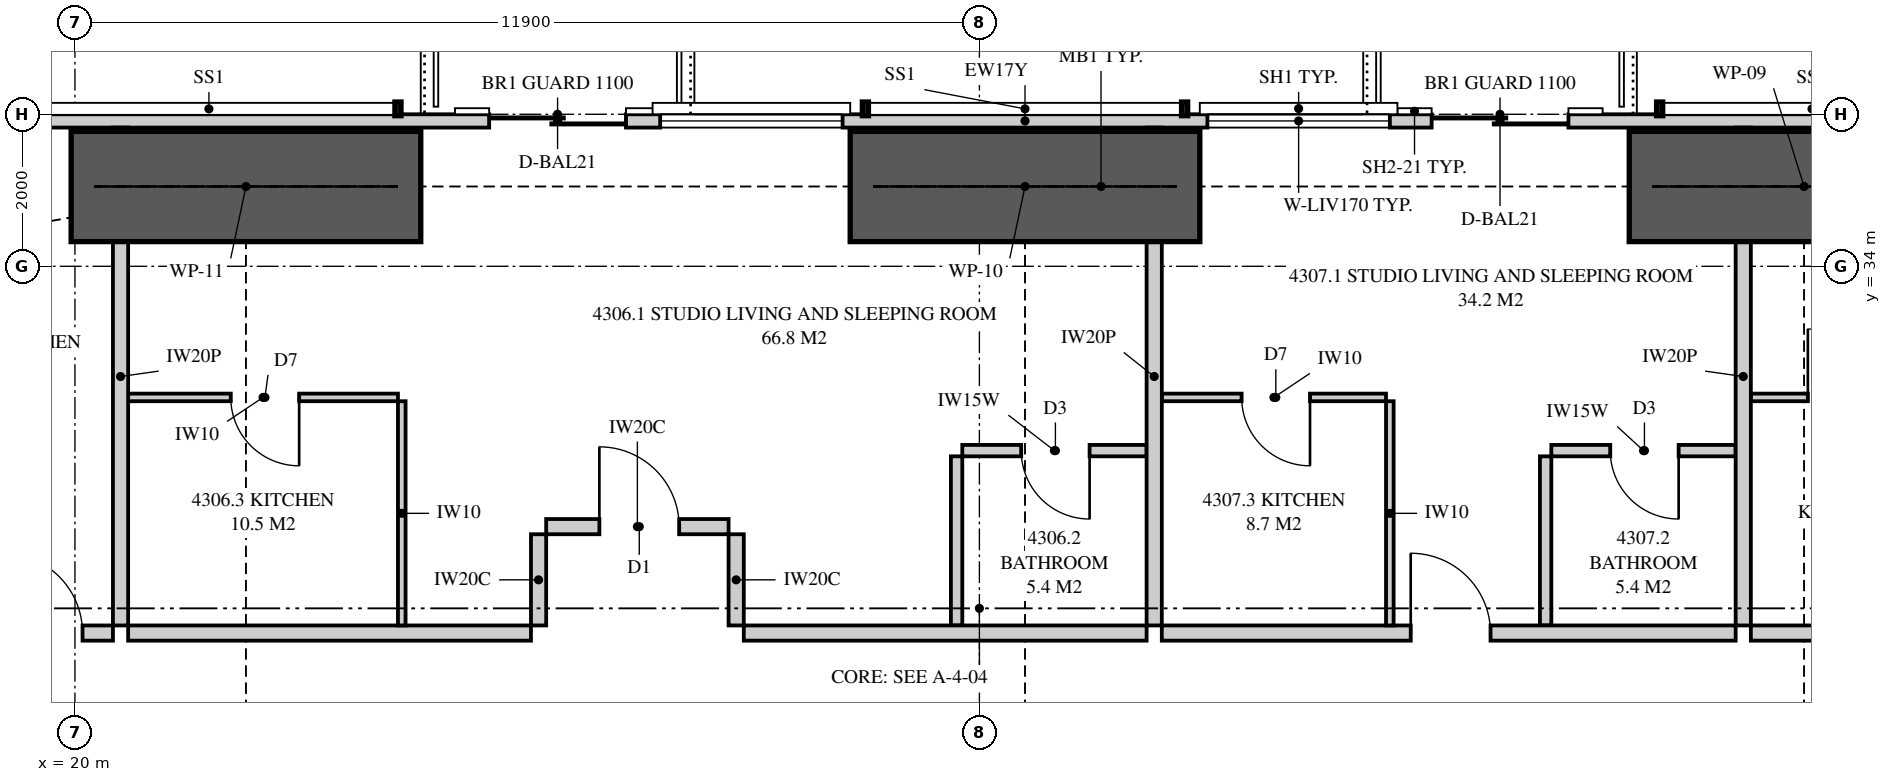
"""IFC4 building model, lengths in metres.
Left out: names, types, materials, properties, quantities, classifications, styles, units other than length and angle.
Written with IfcOpenShell. Run it as: python <this file> out.ifc"""

import sys

from ifc_helpers import new_model, si_unit, direction, frame, frame_2d, origin, place, context, subcontext, project, spatial, polyline, rectangle, outline, extrude, element, fill, save


model = new_model("IFC4")
c1 = context("Model", 3, precision=1e-05, world=origin(), true_north=direction((0.0, 1.0)))
c2 = subcontext(c1, "Body", "Model", "MODEL_VIEW")
j1 = project(units=[si_unit("LENGTHUNIT", "METRE"), si_unit("PLANEANGLEUNIT", "RADIAN")], contexts=[c1])
p1 = place(None, origin())
s1 = spatial("IfcSite", under=j1, at=p1, CompositionType="ELEMENT")
p2 = place(p1, origin())
s2 = spatial("IfcBuilding", under=s1, at=p2, CompositionType="ELEMENT")
p3 = place(p2, frame((0.0, 0.0, 161.05)))
s3 = spatial("IfcBuildingStorey", under=s2, at=p3, CompositionType="ELEMENT", Elevation=161.05)
p4 = place(p3, frame((49.949, 35.913, 0.0), z_axis=(0.0, 0.0, 1.0), x_axis=(-1.0, 0.0, 0.0)))
e1 = element("IfcWall", 1, at=p4, inside=s3, PredefinedType="SOLIDWALL", context=c2, shape_type="SweptSolid", body=[
    extrude(outline(polyline([(0.0, 0.0), (34.897, 0.0), (34.897, 3.11), (27.91, 3.11), (27.91, 2.15), (27.836, 2.15), (27.836, 3.11), (27.699, 3.11), (27.699, 2.15), (7.199, 2.15), (7.199, 3.11), (7.062, 3.11), (7.062, 2.15), (6.987, 2.15), (6.987, 3.11), (0.0, 3.11), (0.0, 0.0)])), frame((0.0, 0.087, 0.0), z_axis=(0.0, -1.0, 0.0), x_axis=(1.0, 0.0, 0.0)), (0.0, 0.0, 1.0), 0.175),
])
p5 = place(p4, frame((2.389, 0.0, 0.4)))
e2 = element("IfcOpeningElement", 2, at=p5, cuts=e1, PredefinedType="OPENING", context=c2, shape_type="SweptSolid", body=[
    extrude(rectangle(XDim=2.4, YDim=1.7, at=frame_2d((1.2, 0.85))), frame((0.0, 0.097, 0.0), z_axis=(0.0, -1.0, 0.0), x_axis=(1.0, 0.0, 0.0)), (0.0, 0.0, 1.0), 0.195),
])
p6 = place(p4, frame((10.299, 0.0, 0.0)))
e3 = element("IfcOpeningElement", 3, at=p6, cuts=e1, PredefinedType="OPENING", context=c2, shape_type="SweptSolid", body=[
    extrude(rectangle(XDim=1.8, YDim=2.1, at=frame_2d((0.9, 1.05))), frame((0.0, 0.097, 0.0), z_axis=(0.0, -1.0, 0.0), x_axis=(1.0, 0.0, 0.0)), (0.0, 0.0, 1.0), 0.195),
])
p7 = place(p4, frame((12.649, 0.0, 0.4)))
e4 = element("IfcOpeningElement", 4, at=p7, cuts=e1, PredefinedType="OPENING", context=c2, shape_type="SweptSolid", body=[
    extrude(rectangle(XDim=2.4, YDim=1.7, at=frame_2d((1.2, 0.85))), frame((0.0, 0.097, 0.0), z_axis=(0.0, -1.0, 0.0), x_axis=(1.0, 0.0, 0.0)), (0.0, 0.0, 1.0), 0.195),
])
p8 = place(p4, frame((22.699, 0.0, 0.0)))
e5 = element("IfcOpeningElement", 5, at=p8, cuts=e1, PredefinedType="OPENING", context=c2, shape_type="SweptSolid", body=[
    extrude(rectangle(XDim=1.8, YDim=2.1, at=frame_2d((0.9, 1.05))), frame((0.0, 0.097, 0.0), z_axis=(0.0, -1.0, 0.0), x_axis=(1.0, 0.0, 0.0)), (0.0, 0.0, 1.0), 0.195),
])
p9 = place(p4, frame((19.849, 0.0, 0.4)))
e6 = element("IfcOpeningElement", 6, at=p9, cuts=e1, PredefinedType="OPENING", context=c2, shape_type="SweptSolid", body=[
    extrude(rectangle(XDim=2.4, YDim=1.7, at=frame_2d((1.2, 0.85))), frame((0.0, 0.097, 0.0), z_axis=(0.0, -1.0, 0.0), x_axis=(1.0, 0.0, 0.0)), (0.0, 0.0, 1.0), 0.195),
])
p10 = place(p4, frame((30.973, 0.0, 0.4)))
e7 = element("IfcOpeningElement", 7, at=p10, cuts=e1, PredefinedType="OPENING", context=c2, shape_type="SweptSolid", body=[
    extrude(rectangle(XDim=2.4, YDim=1.7, at=frame_2d((1.2, 0.85))), frame((0.0, 0.097, 0.0), z_axis=(0.0, -1.0, 0.0), x_axis=(1.0, 0.0, 0.0)), (0.0, 0.0, 1.0), 0.195),
])
p11 = place(p3, frame((20.6, 35.825, 0.0), z_axis=(0.0, 0.0, 1.0), x_axis=(0.0, -1.0, 0.0)))
e8 = element("IfcWall", 8, at=p11, inside=s3, PredefinedType="PARTITIONING", context=c2, shape_type="SweptSolid", body=[
    extrude(outline(polyline([(0.143, 3.11), (0.0, 3.11), (0.0, 0.0), (0.529, 0.0), (0.529, 0.165), (1.021, 0.165), (1.021, 0.0), (6.55, 0.0), (6.55, 3.11), (1.991, 3.11), (1.991, 2.15), (1.021, 2.15), (1.021, 1.985), (0.529, 1.985), (0.529, 2.15), (0.143, 2.15), (0.143, 3.11)])), frame((0.0, 0.1, 0.0), z_axis=(0.0, -1.0, 0.0), x_axis=(1.0, 0.0, 0.0)), (0.0, 0.0, 1.0), 0.2),
])
p12 = place(p3, frame((17.85, 29.175, 0.0), z_axis=(0.0, 0.0, 1.0), x_axis=(1.0, 0.0, 0.0)))
e9 = element("IfcWall", 9, at=p12, inside=s3, PredefinedType="PARTITIONING", context=c2, shape_type="SweptSolid", body=[
    extrude(rectangle(XDim=2.65, YDim=0.2, at=frame_2d((1.325, 0.0))), origin(), (0.0, 0.0, 1.0), 3.11),
])
p13 = place(p12, frame((1.2, 0.0, 0.0)))
e10 = element("IfcOpeningElement", 10, at=p13, cuts=e9, PredefinedType="OPENING", context=c2, shape_type="SweptSolid", body=[
    extrude(rectangle(XDim=1.05, YDim=2.2, at=frame_2d((0.525, 1.1))), frame((0.0, 0.11, 0.0), z_axis=(0.0, -1.0, 0.0), x_axis=(1.0, 0.0, 0.0)), (0.0, 0.0, 1.0), 0.22),
])
p14 = place(p3, frame((34.2, 35.825, 0.0), z_axis=(0.0, 0.0, 1.0), x_axis=(0.0, -1.0, 0.0)))
e11 = element("IfcWall", 11, at=p14, inside=s3, PredefinedType="PARTITIONING", context=c2, shape_type="SweptSolid", body=[
    extrude(outline(polyline([(0.529, 2.15), (0.0, 2.15), (0.0, 0.0), (0.529, 0.0), (0.529, 0.123), (1.021, 0.123), (1.021, 0.0), (6.55, 0.0), (6.55, 3.11), (1.685, 3.11), (1.685, 2.15), (1.021, 2.15), (1.021, 2.027), (0.529, 2.027), (0.529, 2.15)])), frame((0.0, 0.1, 0.0), z_axis=(0.0, -1.0, 0.0), x_axis=(1.0, 0.0, 0.0)), (0.0, 0.0, 1.0), 0.2),
])
p15 = place(p3, frame((20.7, 29.175, 0.0), z_axis=(0.0, 0.0, 1.0), x_axis=(1.0, 0.0, 0.0)))
e12 = element("IfcWall", 12, at=p15, inside=s3, PredefinedType="PARTITIONING", context=c2, shape_type="SweptSolid", body=[
    extrude(outline(polyline([(0.0, 0.0), (5.3, 0.0), (5.3, 3.11), (1.887, 3.11), (1.887, 2.541), (1.213, 2.541), (1.213, 3.11), (0.0, 3.11), (0.0, 0.0)])), frame((0.0, 0.1, 0.0), z_axis=(0.0, -1.0, 0.0), x_axis=(1.0, 0.0, 0.0)), (0.0, 0.0, 1.0), 0.2),
])
p16 = place(p3, frame((31.675, 31.575, 0.0), z_axis=(0.0, 0.0, 1.0), x_axis=(1.0, 0.0, 0.0)))
e13 = element("IfcWall", 13, at=p16, inside=s3, PredefinedType="PLUMBINGWALL", context=c2, shape_type="SweptSolid", body=[
    extrude(outline(polyline([(0.0, 0.0), (2.425, 0.0), (2.425, 3.11), (1.137, 3.11), (1.137, 2.541), (0.513, 2.541), (0.513, 3.11), (0.0, 3.11), (0.0, 0.0)])), frame((0.0, 0.075, 0.0), z_axis=(0.0, -1.0, 0.0), x_axis=(1.0, 0.0, 0.0)), (0.0, 0.0, 1.0), 0.15),
])
p17 = place(p16, frame((0.775, 0.0, 0.0)))
e14 = element("IfcOpeningElement", 14, at=p17, cuts=e13, PredefinedType="OPENING", context=c2, shape_type="SweptSolid", body=[
    extrude(rectangle(XDim=0.9, YDim=2.1, at=frame_2d((0.45, 1.05))), frame((0.0, 0.085, 0.0), z_axis=(0.0, -1.0, 0.0), x_axis=(1.0, 0.0, 0.0)), (0.0, 0.0, 1.0), 0.17),
])
p18 = place(p3, frame((31.6, 31.5, 0.0), z_axis=(0.0, 0.0, 1.0), x_axis=(0.0, -1.0, 0.0)))
e15 = element("IfcWall", 15, at=p18, inside=s3, PredefinedType="PLUMBINGWALL", context=c2, shape_type="SweptSolid", body=[
    extrude(rectangle(XDim=2.225, YDim=0.15, at=frame_2d((1.113, 0.0))), origin(), (0.0, 0.0, 1.0), 3.11),
])
p19 = place(p3, frame((20.7, 32.275, 0.0), z_axis=(0.0, 0.0, 1.0), x_axis=(1.0, 0.0, 0.0)))
e16 = element("IfcWall", 16, at=p19, inside=s3, PredefinedType="PARTITIONING", context=c2, shape_type="SweptSolid", body=[
    extrude(outline(polyline([(0.0, 0.0), (3.55, 0.0), (3.55, 3.11), (1.837, 3.11), (1.837, 2.541), (1.263, 2.541), (1.263, 3.11), (0.0, 3.11), (0.0, 0.0)])), frame((0.0, 0.05, 0.0), z_axis=(0.0, -1.0, 0.0), x_axis=(1.0, 0.0, 0.0)), (0.0, 0.0, 1.0), 0.1),
])
p20 = place(p19, frame((1.35, 0.0, 0.0)))
e17 = element("IfcOpeningElement", 17, at=p20, cuts=e16, PredefinedType="OPENING", context=c2, shape_type="SweptSolid", body=[
    extrude(rectangle(XDim=0.9, YDim=2.1, at=frame_2d((0.45, 1.05))), frame((0.0, 0.06, 0.0), z_axis=(0.0, -1.0, 0.0), x_axis=(1.0, 0.0, 0.0)), (0.0, 0.0, 1.0), 0.12),
])
p21 = place(p3, frame((24.3, 32.225, 0.0), z_axis=(0.0, 0.0, 1.0), x_axis=(0.0, -1.0, 0.0)))
e18 = element("IfcWall", 18, at=p21, inside=s3, PredefinedType="PARTITIONING", context=c2, shape_type="SweptSolid", body=[
    extrude(rectangle(XDim=2.95, YDim=0.1, at=frame_2d((1.475, 0.0))), origin(), (0.0, 0.0, 1.0), 3.11),
])
p22 = place(p3, frame((41.95, 35.825, 0.0), z_axis=(0.0, 0.0, 1.0), x_axis=(0.0, -1.0, 0.0)))
e19 = element("IfcWall", 19, at=p22, inside=s3, PredefinedType="PARTITIONING", context=c2, shape_type="SweptSolid", body=[
    extrude(outline(polyline([(0.529, 2.15), (0.0, 2.15), (0.0, 0.0), (0.529, 0.0), (0.529, 0.876), (1.021, 0.876), (1.021, 0.0), (6.55, 0.0), (6.55, 3.11), (1.685, 3.11), (1.685, 2.15), (1.021, 2.15), (1.021, 1.273), (0.529, 1.273), (0.529, 2.15)])), frame((0.0, 0.1, 0.0), z_axis=(0.0, -1.0, 0.0), x_axis=(1.0, 0.0, 0.0)), (0.0, 0.0, 1.0), 0.2),
])
p23 = place(p3, frame((34.3, 29.175, 0.0), z_axis=(0.0, 0.0, 1.0), x_axis=(1.0, 0.0, 0.0)))
e20 = element("IfcWall", 20, at=p23, inside=s3, PredefinedType="PARTITIONING", context=c2, shape_type="SweptSolid", body=[
    extrude(rectangle(XDim=7.55, YDim=0.2, at=frame_2d((3.775, 0.0))), origin(), (0.0, 0.0, 1.0), 3.11),
])
p24 = place(p23, frame((3.275, 0.0, 0.0)))
e21 = element("IfcOpeningElement", 21, at=p24, cuts=e20, PredefinedType="OPENING", context=c2, shape_type="SweptSolid", body=[
    extrude(rectangle(XDim=1.05, YDim=2.2, at=frame_2d((0.525, 1.1))), frame((0.0, 0.11, 0.0), z_axis=(0.0, -1.0, 0.0), x_axis=(1.0, 0.0, 0.0)), (0.0, 0.0, 1.0), 0.22),
])
p25 = place(p3, frame((39.425, 31.575, 0.0), z_axis=(0.0, 0.0, 1.0), x_axis=(1.0, 0.0, 0.0)))
e22 = element("IfcWall", 22, at=p25, inside=s3, PredefinedType="PLUMBINGWALL", context=c2, shape_type="SweptSolid", body=[
    extrude(rectangle(XDim=2.425, YDim=0.15, at=frame_2d((1.212, 0.0))), origin(), (0.0, 0.0, 1.0), 3.11),
])
p26 = place(p25, frame((0.775, 0.0, 0.0)))
e23 = element("IfcOpeningElement", 23, at=p26, cuts=e22, PredefinedType="OPENING", context=c2, shape_type="SweptSolid", body=[
    extrude(rectangle(XDim=0.9, YDim=2.1, at=frame_2d((0.45, 1.05))), frame((0.0, 0.085, 0.0), z_axis=(0.0, -1.0, 0.0), x_axis=(1.0, 0.0, 0.0)), (0.0, 0.0, 1.0), 0.17),
])
p27 = place(p3, frame((39.35, 31.5, 0.0), z_axis=(0.0, 0.0, 1.0), x_axis=(0.0, -1.0, 0.0)))
e24 = element("IfcWall", 24, at=p27, inside=s3, PredefinedType="PLUMBINGWALL", context=c2, shape_type="SweptSolid", body=[
    extrude(rectangle(XDim=2.225, YDim=0.15, at=frame_2d((1.113, 0.0))), origin(), (0.0, 0.0, 1.0), 3.11),
])
p28 = place(p3, frame((34.3, 32.275, 0.0), z_axis=(0.0, 0.0, 1.0), x_axis=(1.0, 0.0, 0.0)))
e25 = element("IfcWall", 25, at=p28, inside=s3, PredefinedType="PARTITIONING", context=c2, shape_type="SweptSolid", body=[
    extrude(rectangle(XDim=2.95, YDim=0.1, at=frame_2d((1.475, 0.0))), origin(), (0.0, 0.0, 1.0), 3.11),
])
p29 = place(p28, frame((1.05, 0.0, 0.0)))
e26 = element("IfcOpeningElement", 26, at=p29, cuts=e25, PredefinedType="OPENING", context=c2, shape_type="SweptSolid", body=[
    extrude(rectangle(XDim=0.9, YDim=2.1, at=frame_2d((0.45, 1.05))), frame((0.0, 0.06, 0.0), z_axis=(0.0, -1.0, 0.0), x_axis=(1.0, 0.0, 0.0)), (0.0, 0.0, 1.0), 0.12),
])
p30 = place(p3, frame((37.3, 32.225, 0.0), z_axis=(0.0, 0.0, 1.0), x_axis=(0.0, -1.0, 0.0)))
e27 = element("IfcWall", 27, at=p30, inside=s3, PredefinedType="PARTITIONING", context=c2, shape_type="SweptSolid", body=[
    extrude(rectangle(XDim=2.95, YDim=0.1, at=frame_2d((1.475, 0.0))), origin(), (0.0, 0.0, 1.0), 3.11),
])
p31 = place(p3, frame((42.05, 29.175, 0.0), z_axis=(0.0, 0.0, 1.0), x_axis=(1.0, 0.0, 0.0)))
e28 = element("IfcWall", 28, at=p31, inside=s3, PredefinedType="PARTITIONING", context=c2, shape_type="SweptSolid", body=[
    extrude(outline(polyline([(0.0, 0.0), (3.9, 0.0), (3.9, 3.11), (1.037, 3.11), (1.037, 2.541), (0.363, 2.541), (0.363, 3.11), (0.0, 3.11), (0.0, 0.0)])), frame((0.0, 0.1, 0.0), z_axis=(0.0, -1.0, 0.0), x_axis=(1.0, 0.0, 0.0)), (0.0, 0.0, 1.0), 0.2),
])
p32 = place(p31, frame((2.7, 0.0, 0.0)))
e29 = element("IfcOpeningElement", 29, at=p32, cuts=e28, PredefinedType="OPENING", context=c2, shape_type="SweptSolid", body=[
    extrude(rectangle(XDim=1.05, YDim=2.2, at=frame_2d((0.525, 1.1))), frame((0.0, 0.11, 0.0), z_axis=(0.0, -1.0, 0.0), x_axis=(1.0, 0.0, 0.0)), (0.0, 0.0, 1.0), 0.22),
])
p33 = place(p3, frame((42.05, 32.275, 0.0), z_axis=(0.0, 0.0, 1.0), x_axis=(1.0, 0.0, 0.0)))
e30 = element("IfcWall", 30, at=p33, inside=s3, PredefinedType="PARTITIONING", context=c2, shape_type="SweptSolid", body=[
    extrude(outline(polyline([(0.0, 0.0), (2.35, 0.0), (2.35, 3.11), (0.987, 3.11), (0.987, 2.541), (0.413, 2.541), (0.413, 3.11), (0.0, 3.11), (0.0, 0.0)])), frame((0.0, 0.05, 0.0), z_axis=(0.0, -1.0, 0.0), x_axis=(1.0, 0.0, 0.0)), (0.0, 0.0, 1.0), 0.1),
])
p34 = place(p33, frame((0.75, 0.0, 0.0)))
e31 = element("IfcOpeningElement", 31, at=p34, cuts=e30, PredefinedType="OPENING", context=c2, shape_type="SweptSolid", body=[
    extrude(rectangle(XDim=0.9, YDim=2.1, at=frame_2d((0.45, 1.05))), frame((0.0, 0.06, 0.0), z_axis=(0.0, -1.0, 0.0), x_axis=(1.0, 0.0, 0.0)), (0.0, 0.0, 1.0), 0.12),
])
p35 = place(p3, frame((28.8, 29.175, 0.0), z_axis=(0.0, 0.0, 1.0), x_axis=(1.0, 0.0, 0.0)))
e32 = element("IfcWall", 32, at=p35, inside=s3, PredefinedType="PARTITIONING", context=c2, shape_type="SweptSolid", body=[
    extrude(outline(polyline([(0.0, 0.0), (5.3, 0.0), (5.3, 3.11), (4.037, 3.11), (4.037, 2.541), (3.363, 2.541), (3.363, 3.11), (0.0, 3.11), (0.0, 0.0)])), frame((0.0, 0.1, 0.0), z_axis=(0.0, -1.0, 0.0), x_axis=(1.0, 0.0, 0.0)), (0.0, 0.0, 1.0), 0.2),
])
p36 = place(p3, frame((26.2, 30.575, 0.0), z_axis=(0.0, 0.0, 1.0), x_axis=(1.0, 0.0, 0.0)))
e33 = element("IfcWall", 33, at=p36, inside=s3, PredefinedType="PARTITIONING", context=c2, shape_type="SweptSolid", body=[
    extrude(rectangle(XDim=2.4, YDim=0.2, at=frame_2d((1.2, 0.0))), origin(), (0.0, 0.0, 1.0), 3.11),
])
p37 = place(p36, frame((0.7, 0.0, 0.0)))
e34 = element("IfcOpeningElement", 34, at=p37, cuts=e33, PredefinedType="OPENING", context=c2, shape_type="SweptSolid", body=[
    extrude(rectangle(XDim=1.05, YDim=2.2, at=frame_2d((0.525, 1.1))), frame((0.0, 0.11, 0.0), z_axis=(0.0, -1.0, 0.0), x_axis=(1.0, 0.0, 0.0)), (0.0, 0.0, 1.0), 0.22),
])
for number, where, z_axis, x_axis in (
    (35, (26.1, 29.275, 0.0), (0.0, 0.0, 1.0), (0.0, 1.0, 0.0)),
    (36, (28.7, 29.275, 0.0), (0.0, 0.0, 1.0), (0.0, 1.0, 0.0)),
):
    element("IfcWall", number, at=place(p3, frame(where, z_axis=z_axis, x_axis=x_axis)), inside=s3, PredefinedType="PARTITIONING", context=c2, shape_type="SweptSolid", body=[
        extrude(rectangle(XDim=1.2, YDim=0.2, at=frame_2d((0.6, 0.0))), origin(), (0.0, 0.0, 1.0), 3.11),
    ])
for number, where, z_axis, x_axis in (
    (37, (40.45, 35.05, 0.0), (0.0, 0.0, 1.0), (1.0, 0.0, 0.0)),
    (38, (30.2, 35.05, 0.0), (0.0, 0.0, 1.0), (1.0, 0.0, 0.0)),
    (39, (19.95, 35.05, 0.0), (0.0, 0.0, 1.0), (1.0, 0.0, 0.0)),
):
    element("IfcWall", number, at=place(p3, frame(where, z_axis=z_axis, x_axis=x_axis)), inside=s3, PredefinedType="SHEAR", context=c2, shape_type="SweptSolid", body=[
        extrude(rectangle(XDim=4.6, YDim=1.45, at=frame_2d((2.3, 0.0))), origin(), (0.0, 0.0, 1.0), 3.35),
    ])
p38 = place(p6, origin())
e40 = element("IfcDoor", 40, at=p38, inside=s3, OperationType="SLIDING_TO_LEFT", PredefinedType="DOOR", context=c2, shape_type="SweptSolid", body=[
    extrude(rectangle(XDim=1.8, YDim=2.1, at=frame_2d((0.9, 1.05))), frame((0.0, 0.025, 0.0), z_axis=(0.0, -1.0, 0.0), x_axis=(1.0, 0.0, 0.0)), (0.0, 0.0, 1.0), 0.05),
])
fill(e3, e40)
p39 = place(p7, origin())
e41 = element("IfcWindow", 41, at=p39, inside=s3, PartitioningType="SINGLE_PANEL", PredefinedType="WINDOW", context=c2, shape_type="SweptSolid", body=[
    extrude(rectangle(XDim=2.4, YDim=1.7, at=frame_2d((1.2, 0.85))), frame((0.0, 0.03, 0.0), z_axis=(0.0, -1.0, 0.0), x_axis=(1.0, 0.0, 0.0)), (0.0, 0.0, 1.0), 0.06),
])
fill(e4, e41)
p40 = place(p8, origin())
e42 = element("IfcDoor", 42, at=p40, inside=s3, OperationType="SLIDING_TO_LEFT", PredefinedType="DOOR", context=c2, shape_type="SweptSolid", body=[
    extrude(rectangle(XDim=1.8, YDim=2.1, at=frame_2d((0.9, 1.05))), frame((0.0, 0.025, 0.0), z_axis=(0.0, -1.0, 0.0), x_axis=(1.0, 0.0, 0.0)), (0.0, 0.0, 1.0), 0.05),
])
fill(e5, e42)
p41 = place(p9, origin())
e43 = element("IfcWindow", 43, at=p41, inside=s3, PartitioningType="SINGLE_PANEL", PredefinedType="WINDOW", context=c2, shape_type="SweptSolid", body=[
    extrude(rectangle(XDim=2.4, YDim=1.7, at=frame_2d((1.2, 0.85))), frame((0.0, 0.03, 0.0), z_axis=(0.0, -1.0, 0.0), x_axis=(1.0, 0.0, 0.0)), (0.0, 0.0, 1.0), 0.06),
])
fill(e6, e43)
p42 = place(p13, origin())
e44 = element("IfcDoor", 44, at=p42, inside=s3, OperationType="SINGLE_SWING_LEFT", PredefinedType="DOOR", context=c2, shape_type="SweptSolid", body=[
    extrude(rectangle(XDim=1.05, YDim=2.2, at=frame_2d((0.525, 1.1))), frame((0.0, 0.025, 0.0), z_axis=(0.0, -1.0, 0.0), x_axis=(1.0, 0.0, 0.0)), (0.0, 0.0, 1.0), 0.05),
])
fill(e10, e44)
p43 = place(p37, origin())
e45 = element("IfcDoor", 45, at=p43, inside=s3, OperationType="SINGLE_SWING_LEFT", PredefinedType="DOOR", context=c2, shape_type="SweptSolid", body=[
    extrude(rectangle(XDim=1.05, YDim=2.2, at=frame_2d((0.525, 1.1))), frame((0.0, 0.025, 0.0), z_axis=(0.0, -1.0, 0.0), x_axis=(1.0, 0.0, 0.0)), (0.0, 0.0, 1.0), 0.05),
])
fill(e34, e45)
p44 = place(p17, frame((0.9, 0.0, 0.0), z_axis=(0.0, 0.0, 1.0), x_axis=(-1.0, 0.0, 0.0)))
e46 = element("IfcDoor", 46, at=p44, inside=s3, OperationType="SINGLE_SWING_LEFT", PredefinedType="DOOR", context=c2, shape_type="SweptSolid", body=[
    extrude(rectangle(XDim=0.9, YDim=2.1, at=frame_2d((0.45, 1.05))), frame((0.0, 0.025, 0.0), z_axis=(0.0, -1.0, 0.0), x_axis=(1.0, 0.0, 0.0)), (0.0, 0.0, 1.0), 0.05),
])
fill(e14, e46)
p45 = place(p20, frame((0.9, 0.0, 0.0), z_axis=(0.0, 0.0, 1.0), x_axis=(-1.0, 0.0, 0.0)))
e47 = element("IfcDoor", 47, at=p45, inside=s3, OperationType="SINGLE_SWING_LEFT", PredefinedType="DOOR", context=c2, shape_type="SweptSolid", body=[
    extrude(rectangle(XDim=0.9, YDim=2.1, at=frame_2d((0.45, 1.05))), frame((0.0, 0.025, 0.0), z_axis=(0.0, -1.0, 0.0), x_axis=(1.0, 0.0, 0.0)), (0.0, 0.0, 1.0), 0.05),
])
fill(e17, e47)
p46 = place(p24, origin())
e48 = element("IfcDoor", 48, at=p46, inside=s3, OperationType="SINGLE_SWING_LEFT", PredefinedType="DOOR", context=c2, shape_type="SweptSolid", body=[
    extrude(rectangle(XDim=1.05, YDim=2.2, at=frame_2d((0.525, 1.1))), frame((0.0, 0.025, 0.0), z_axis=(0.0, -1.0, 0.0), x_axis=(1.0, 0.0, 0.0)), (0.0, 0.0, 1.0), 0.05),
])
fill(e21, e48)
p47 = place(p26, frame((0.9, 0.0, 0.0), z_axis=(0.0, 0.0, 1.0), x_axis=(-1.0, 0.0, 0.0)))
e49 = element("IfcDoor", 49, at=p47, inside=s3, OperationType="SINGLE_SWING_LEFT", PredefinedType="DOOR", context=c2, shape_type="SweptSolid", body=[
    extrude(rectangle(XDim=0.9, YDim=2.1, at=frame_2d((0.45, 1.05))), frame((0.0, 0.025, 0.0), z_axis=(0.0, -1.0, 0.0), x_axis=(1.0, 0.0, 0.0)), (0.0, 0.0, 1.0), 0.05),
])
fill(e23, e49)
p48 = place(p29, frame((0.9, 0.0, 0.0), z_axis=(0.0, 0.0, 1.0), x_axis=(-1.0, 0.0, 0.0)))
e50 = element("IfcDoor", 50, at=p48, inside=s3, OperationType="SINGLE_SWING_LEFT", PredefinedType="DOOR", context=c2, shape_type="SweptSolid", body=[
    extrude(rectangle(XDim=0.9, YDim=2.1, at=frame_2d((0.45, 1.05))), frame((0.0, 0.025, 0.0), z_axis=(0.0, -1.0, 0.0), x_axis=(1.0, 0.0, 0.0)), (0.0, 0.0, 1.0), 0.05),
])
fill(e26, e50)
p49 = place(p34, origin())
e51 = element("IfcDoor", 51, at=p49, inside=s3, OperationType="SINGLE_SWING_LEFT", PredefinedType="DOOR", context=c2, shape_type="SweptSolid", body=[
    extrude(rectangle(XDim=0.9, YDim=2.1, at=frame_2d((0.45, 1.05))), frame((0.0, 0.025, 0.0), z_axis=(0.0, -1.0, 0.0), x_axis=(1.0, 0.0, 0.0)), (0.0, 0.0, 1.0), 0.05),
])
fill(e31, e51)
save(model, sys.argv[1])
